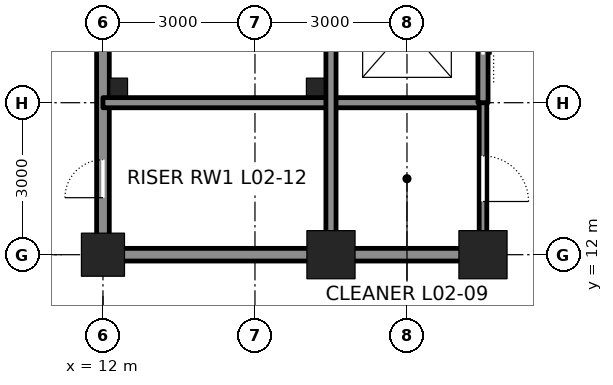
"""IFC4 building model, lengths in metres.
Left out: names, types, materials, properties, quantities, classifications, styles, units other than length and angle.
Written with IfcOpenShell. Run it as: python <this file> out.ifc"""

import sys

from ifc_helpers import new_model, si_unit, direction, frame, frame_2d, origin, origin_2d, place, context, subcontext, project, spatial, rectangle, hollow_rectangle, extrude, element, fill, save


model = new_model("IFC4")
c1 = context("Model", 3, precision=1e-05, world=origin(), true_north=direction((0.0, 1.0)))
c2 = subcontext(c1, "Body", "Model", "MODEL_VIEW")
j1 = project(units=[si_unit("LENGTHUNIT", "METRE"), si_unit("PLANEANGLEUNIT", "RADIAN")], contexts=[c1])
p1 = place(None, origin())
s1 = spatial("IfcSite", under=j1, at=p1, CompositionType="ELEMENT")
p2 = place(p1, origin())
s2 = spatial("IfcBuilding", under=s1, at=p2, CompositionType="ELEMENT")
p3 = place(p2, frame((0.0, 0.0, 13.5)))
s3 = spatial("IfcBuildingStorey", under=s2, at=p3, CompositionType="ELEMENT", Elevation=13.5)
p4 = place(p3, frame((12.0, 12.0, 0.0), z_axis=(0.0, 0.0, 1.0), x_axis=(1.0, 0.0, 0.0)))
e1 = element("IfcColumn", 1, at=p4, inside=s3, PredefinedType="COLUMN", context=c2, shape_type="SweptSolid", body=[
    extrude(hollow_rectangle(XDim=0.85, YDim=0.85, WallThickness=0.085, at=origin_2d()), origin(), (0.0, 0.0, 1.0), 6.0),
])
for number, where, z_axis, x_axis in (
    (2, (16.5, 12.0, 0.0), (0.0, 0.0, 1.0), (1.0, 0.0, 0.0)),
    (3, (19.5, 12.0, 0.0), (0.0, 0.0, 1.0), (1.0, 0.0, 0.0)),
):
    element("IfcColumn", number, at=place(p3, frame(where, z_axis=z_axis, x_axis=x_axis)), inside=s3, PredefinedType="COLUMN", context=c2, shape_type="SweptSolid", body=[
        extrude(hollow_rectangle(XDim=0.95, YDim=0.95, WallThickness=0.095, at=origin_2d()), origin(), (0.0, 0.0, 1.0), 6.0),
    ])
p5 = place(p3, frame((12.0, 12.25, 0.0), z_axis=(0.0, 0.0, 1.0), x_axis=(0.0, 1.0, 0.0)))
e4 = element("IfcWall", 4, at=p5, inside=s3, PredefinedType="SOLIDWALL", context=c2, shape_type="SweptSolid", body=[
    extrude(rectangle(XDim=8.5, YDim=0.25, at=frame_2d((4.25, 0.0))), origin(), (0.0, 0.0, 1.0), 4.873),
])
p6 = place(p5, frame((0.875, 0.0, 0.0)))
e5 = element("IfcOpeningElement", 5, at=p6, cuts=e4, PredefinedType="OPENING", context=c2, shape_type="SweptSolid", body=[
    extrude(rectangle(XDim=0.75, YDim=2.1, at=frame_2d((0.375, 1.05))), frame((0.0, 0.135, 0.0), z_axis=(0.0, -1.0, 0.0), x_axis=(1.0, 0.0, 0.0)), (0.0, 0.0, 1.0), 0.27),
])
p7 = place(p3, frame((12.25, 12.0, 0.0), z_axis=(0.0, 0.0, 1.0), x_axis=(1.0, 0.0, 0.0)))
e6 = element("IfcWall", 6, at=p7, inside=s3, PredefinedType="SOLIDWALL", context=c2, shape_type="SweptSolid", body=[
    extrude(rectangle(XDim=4.0, YDim=0.25, at=frame_2d((2.0, 0.0))), origin(), (0.0, 0.0, 1.0), 4.941),
])
p8 = place(p3, frame((16.75, 12.0, 0.0), z_axis=(0.0, 0.0, 1.0), x_axis=(1.0, 0.0, 0.0)))
e7 = element("IfcWall", 7, at=p8, inside=s3, PredefinedType="SOLIDWALL", context=c2, shape_type="SweptSolid", body=[
    extrude(rectangle(XDim=2.5, YDim=0.25, at=frame_2d((1.25, 0.0))), origin(), (0.0, 0.0, 1.0), 4.941),
])
p9 = place(p3, frame((12.0, 15.0, 0.0), z_axis=(0.0, 0.0, 1.0), x_axis=(1.0, 0.0, 0.0)))
e8 = element("IfcWall", 8, at=p9, inside=s3, PredefinedType="SOLIDWALL", context=c2, shape_type="SweptSolid", body=[
    extrude(rectangle(XDim=7.5, YDim=0.2, at=frame_2d((3.75, 0.0))), origin(), (0.0, 0.0, 1.0), 5.8),
])
p10 = place(p3, frame((16.5, 12.25, 0.0), z_axis=(0.0, 0.0, 1.0), x_axis=(0.0, 1.0, 0.0)))
e9 = element("IfcWall", 9, at=p10, inside=s3, PredefinedType="SOLIDWALL", context=c2, shape_type="SweptSolid", body=[
    extrude(rectangle(XDim=8.5, YDim=0.2, at=frame_2d((4.25, 0.0))), origin(), (0.0, 0.0, 1.0), 4.873),
])
p11 = place(p3, frame((19.5, 12.25, 0.0), z_axis=(0.0, 0.0, 1.0), x_axis=(0.0, 1.0, 0.0)))
e10 = element("IfcWall", 10, at=p11, inside=s3, PredefinedType="PARTITIONING", context=c2, shape_type="SweptSolid", body=[
    extrude(rectangle(XDim=2.75, YDim=0.15, at=frame_2d((1.375, 0.0))), origin(), (0.0, 0.0, 1.0), 4.825),
])
p12 = place(p11, frame((0.8, 0.0, 0.0)))
e11 = element("IfcOpeningElement", 11, at=p12, cuts=e10, PredefinedType="OPENING", context=c2, shape_type="SweptSolid", body=[
    extrude(rectangle(XDim=0.9, YDim=2.1, at=frame_2d((0.45, 1.05))), frame((0.0, 0.085, 0.0), z_axis=(0.0, -1.0, 0.0), x_axis=(1.0, 0.0, 0.0)), (0.0, 0.0, 1.0), 0.17),
])
p13 = place(p3, frame((19.5, 15.0, 0.0), z_axis=(0.0, 0.0, 1.0), x_axis=(0.0, 1.0, 0.0)))
e12 = element("IfcWall", 12, at=p13, inside=s3, PredefinedType="SOLIDWALL", context=c2, shape_type="SweptSolid", body=[
    extrude(rectangle(XDim=12.0, YDim=0.2, at=frame_2d((6.0, 0.0))), origin(), (0.0, 0.0, 1.0), 4.825),
])
p14 = place(p13, frame((0.95, 0.0, 0.0)))
e13 = element("IfcOpeningElement", 13, at=p14, cuts=e12, PredefinedType="OPENING", context=c2, shape_type="SweptSolid", body=[
    extrude(rectangle(XDim=1.1, YDim=2.1, at=frame_2d((0.55, 1.05))), frame((0.0, 0.11, 0.0), z_axis=(0.0, -1.0, 0.0), x_axis=(1.0, 0.0, 0.0)), (0.0, 0.0, 1.0), 0.22),
])
p15 = place(p13, frame((3.95, 0.0, 0.0)))
e14 = element("IfcOpeningElement", 14, at=p15, cuts=e12, PredefinedType="OPENING", context=c2, shape_type="SweptSolid", body=[
    extrude(rectangle(XDim=1.1, YDim=2.1, at=frame_2d((0.55, 1.05))), frame((0.0, 0.11, 0.0), z_axis=(0.0, -1.0, 0.0), x_axis=(1.0, 0.0, 0.0)), (0.0, 0.0, 1.0), 0.22),
])
p16 = place(p13, frame((6.95, 0.0, 0.0)))
e15 = element("IfcOpeningElement", 15, at=p16, cuts=e12, PredefinedType="OPENING", context=c2, shape_type="SweptSolid", body=[
    extrude(rectangle(XDim=1.1, YDim=2.1, at=frame_2d((0.55, 1.05))), frame((0.0, 0.11, 0.0), z_axis=(0.0, -1.0, 0.0), x_axis=(1.0, 0.0, 0.0)), (0.0, 0.0, 1.0), 0.22),
])
p17 = place(p13, frame((9.95, 0.0, 0.0)))
e16 = element("IfcOpeningElement", 16, at=p17, cuts=e12, PredefinedType="OPENING", context=c2, shape_type="SweptSolid", body=[
    extrude(rectangle(XDim=1.1, YDim=2.1, at=frame_2d((0.55, 1.05))), frame((0.0, 0.11, 0.0), z_axis=(0.0, -1.0, 0.0), x_axis=(1.0, 0.0, 0.0)), (0.0, 0.0, 1.0), 0.22),
])
for number, where, z_axis, x_axis in (
    (17, (12.31, 15.31, 0.0), (0.0, 0.0, 1.0), (1.0, 0.0, 0.0)),
    (18, (16.19, 15.31, 0.0), (0.0, 0.0, 1.0), (1.0, 0.0, 0.0)),
):
    element("IfcColumn", number, at=place(p3, frame(where, z_axis=z_axis, x_axis=x_axis)), inside=s3, PredefinedType="COLUMN", context=c2, shape_type="SweptSolid", body=[
        extrude(hollow_rectangle(XDim=0.35, YDim=0.35, WallThickness=0.035, at=origin_2d()), origin(), (0.0, 0.0, 1.0), 6.0),
    ])
p18 = place(p6, origin())
e19 = element("IfcDoor", 19, at=p18, inside=s3, OperationType="SINGLE_SWING_LEFT", PredefinedType="DOOR", context=c2, shape_type="SweptSolid", body=[
    extrude(rectangle(XDim=0.75, YDim=2.1, at=frame_2d((0.375, 1.05))), frame((0.0, 0.025, 0.0), z_axis=(0.0, -1.0, 0.0), x_axis=(1.0, 0.0, 0.0)), (0.0, 0.0, 1.0), 0.05),
])
fill(e5, e19)
p19 = place(p12, frame((0.9, 0.0, 0.0), z_axis=(0.0, 0.0, 1.0), x_axis=(-1.0, 0.0, 0.0)))
e20 = element("IfcDoor", 20, at=p19, inside=s3, OperationType="SINGLE_SWING_RIGHT", PredefinedType="DOOR", context=c2, shape_type="SweptSolid", body=[
    extrude(rectangle(XDim=0.9, YDim=2.1, at=frame_2d((0.45, 1.05))), frame((0.0, 0.025, 0.0), z_axis=(0.0, -1.0, 0.0), x_axis=(1.0, 0.0, 0.0)), (0.0, 0.0, 1.0), 0.05),
])
fill(e11, e20)
p20 = place(p14, origin())
e21 = element("IfcDoor", 21, at=p20, inside=s3, OperationType="DOUBLE_DOOR_SLIDING", PredefinedType="DOOR", context=c2, shape_type="SweptSolid", body=[
    extrude(rectangle(XDim=1.1, YDim=2.1, at=frame_2d((0.55, 1.05))), frame((0.0, 0.025, 0.0), z_axis=(0.0, -1.0, 0.0), x_axis=(1.0, 0.0, 0.0)), (0.0, 0.0, 1.0), 0.05),
])
fill(e13, e21)
save(model, sys.argv[1])
